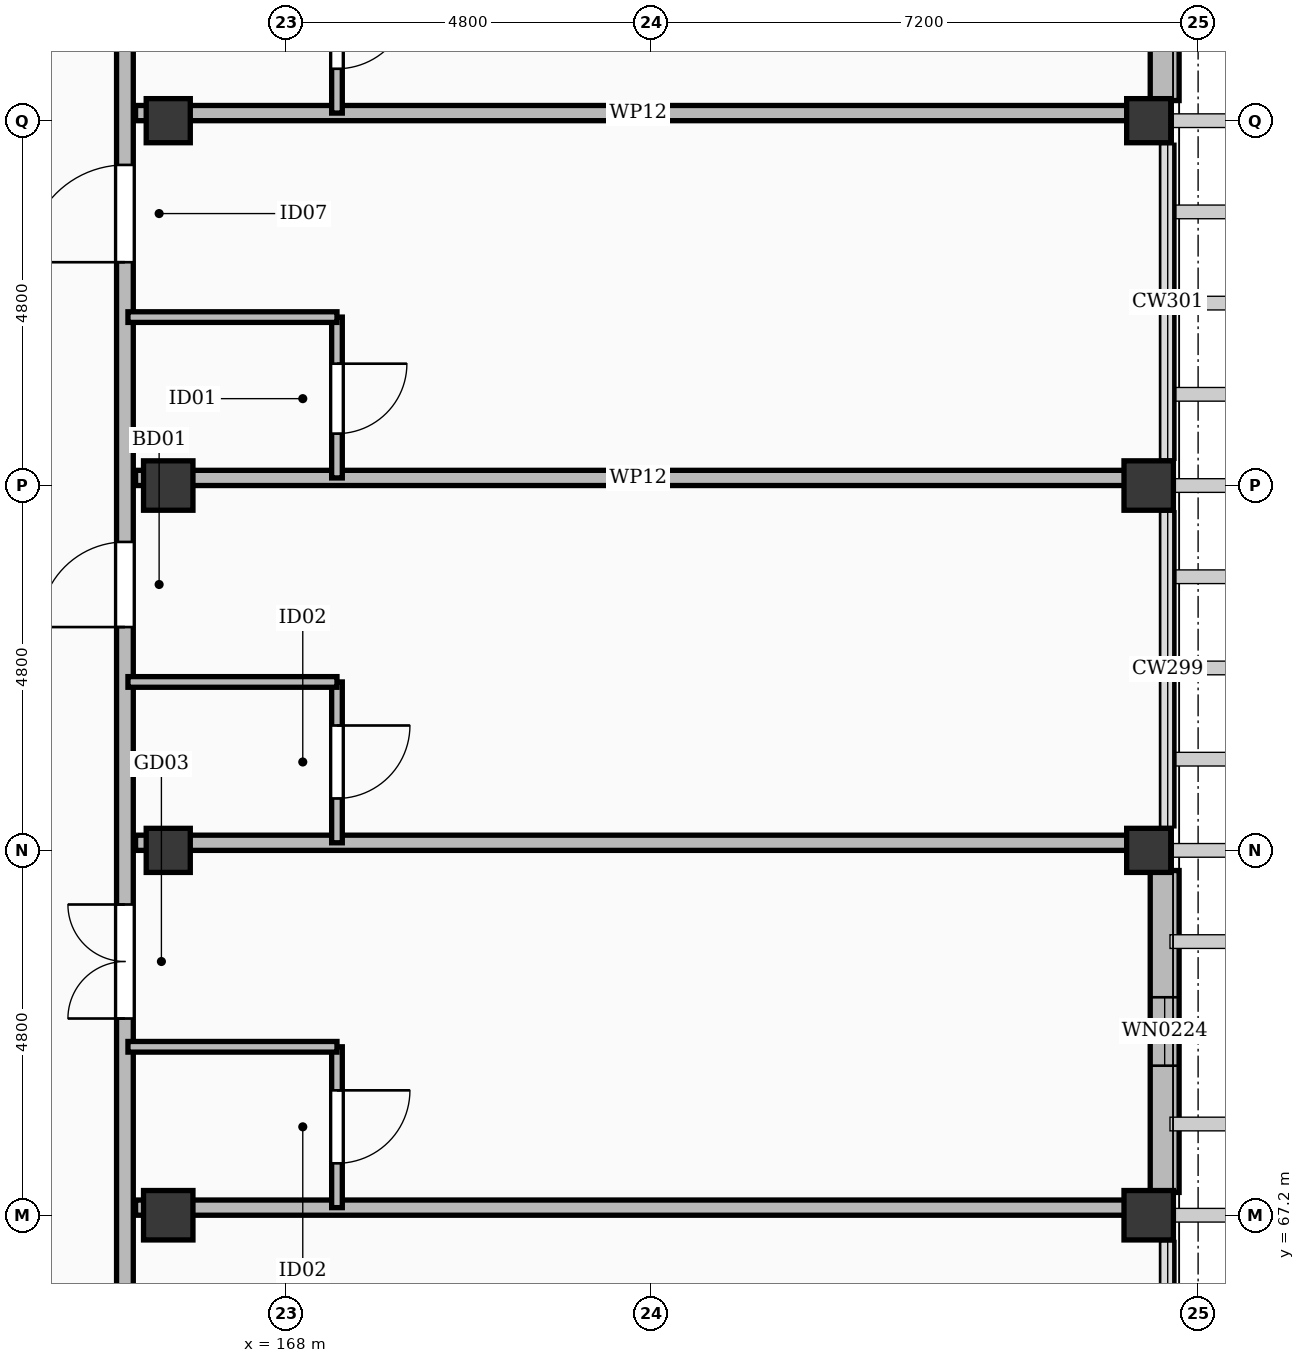
"""IFC4 building model, lengths in metres.
Left out: names, types, materials, properties, quantities, classifications, styles, units other than length and angle.
Written with IfcOpenShell. Run it as: python <this file> out.ifc"""

import sys

from ifc_helpers import new_model, si_unit, direction, frame, frame_2d, origin, origin_2d, place, context, subcontext, project, spatial, rectangle, extrude, element, fill, save


model = new_model("IFC4")
c1 = context("Model", 3, precision=1e-05, world=origin(), true_north=direction((0.0, 1.0)))
c2 = subcontext(c1, "Body", "Model", "MODEL_VIEW")
j1 = project(units=[si_unit("LENGTHUNIT", "METRE"), si_unit("PLANEANGLEUNIT", "RADIAN")], contexts=[c1])
p1 = place(None, origin())
s1 = spatial("IfcSite", under=j1, at=p1, CompositionType="ELEMENT")
p2 = place(p1, origin())
s2 = spatial("IfcBuilding", under=s1, at=p2, CompositionType="ELEMENT")
p3 = place(p2, frame((0.0, 0.0, 39.0)))
s3 = spatial("IfcBuildingStorey", under=s2, at=p3, CompositionType="ELEMENT", Elevation=39.0)
for number, where, z_axis, x_axis in (
    (1, (166.45, 67.2, 0.0), (0.0, 0.0, 1.0), (1.0, 0.0, 0.0)),
    (2, (166.45, 76.8, 0.0), (0.0, 0.0, 1.0), (1.0, 0.0, 0.0)),
    (3, (179.35, 67.2, 0.0), (0.0, 0.0, 1.0), (1.0, 0.0, 0.0)),
    (4, (179.35, 76.8, 0.0), (0.0, 0.0, 1.0), (1.0, 0.0, 0.0)),
):
    element("IfcColumn", number, at=place(p3, frame(where, z_axis=z_axis, x_axis=x_axis)), inside=s3, PredefinedType="COLUMN", context=c2, shape_type="SweptSolid", body=[
        extrude(rectangle(XDim=0.65, YDim=0.65, at=origin_2d()), origin(), (0.0, 0.0, 1.0), 3.6),
    ])
for number, where, z_axis, x_axis in (
    (5, (166.45, 72.0, 0.0), (0.0, 0.0, 1.0), (1.0, 0.0, 0.0)),
    (6, (166.45, 81.6, 0.0), (0.0, 0.0, 1.0), (1.0, 0.0, 0.0)),
    (7, (179.35, 72.0, 0.0), (0.0, 0.0, 1.0), (1.0, 0.0, 0.0)),
    (8, (179.35, 81.6, 0.0), (0.0, 0.0, 1.0), (1.0, 0.0, 0.0)),
):
    element("IfcColumn", number, at=place(p3, frame(where, z_axis=z_axis, x_axis=x_axis)), inside=s3, PredefinedType="COLUMN", context=c2, shape_type="SweptSolid", body=[
        extrude(rectangle(XDim=0.58, YDim=0.58, at=origin_2d()), origin(), (0.0, 0.0, 1.0), 3.6),
    ])
p4 = place(p3, frame((179.56, 71.735, 0.0), z_axis=(0.0, 0.0, 1.0), x_axis=(0.0, -1.0, 0.0)))
e9 = element("IfcWall", 9, at=p4, inside=s3, PredefinedType="SOLIDWALL", context=c2, shape_type="SweptSolid", body=[
    extrude(rectangle(XDim=4.235, YDim=0.38, at=frame_2d((2.118, 0.0))), origin(), (0.0, 0.0, 1.0), 2.602),
])
p5 = place(p4, frame((1.667, 0.0, 0.55)))
e10 = element("IfcOpeningElement", 10, at=p5, cuts=e9, PredefinedType="OPENING", context=c2, shape_type="SweptSolid", body=[
    extrude(rectangle(XDim=0.9, YDim=1.68, at=frame_2d((0.45, 0.84))), frame((0.0, 0.202, 0.0), z_axis=(0.0, -1.0, 0.0), x_axis=(1.0, 0.0, 0.0)), (0.0, 0.0, 1.0), 0.404),
])
p6 = place(p3, frame((179.56, 86.1, 0.0), z_axis=(0.0, 0.0, 1.0), x_axis=(0.0, -1.0, 0.0)))
e11 = element("IfcWall", 11, at=p6, inside=s3, PredefinedType="SOLIDWALL", context=c2, shape_type="SweptSolid", body=[
    extrude(rectangle(XDim=4.235, YDim=0.38, at=frame_2d((2.118, 0.0))), origin(), (0.0, 0.0, 1.0), 2.602),
])
p7 = place(p6, frame((0.992, 0.0, 0.55)))
e12 = element("IfcOpeningElement", 12, at=p7, cuts=e11, PredefinedType="OPENING", context=c2, shape_type="SweptSolid", body=[
    extrude(rectangle(XDim=2.25, YDim=1.79, at=frame_2d((1.125, 0.895))), frame((0.0, 0.202, 0.0), z_axis=(0.0, -1.0, 0.0), x_axis=(1.0, 0.0, 0.0)), (0.0, 0.0, 1.0), 0.404),
])
p8 = place(p3, frame((165.88, 57.95, 0.0), z_axis=(0.0, 0.0, 1.0), x_axis=(0.0, 1.0, 0.0)))
e13 = element("IfcWall", 13, at=p8, inside=s3, PredefinedType="PARTITIONING", context=c2, shape_type="SweptSolid", body=[
    extrude(rectangle(XDim=67.7, YDim=0.22, at=frame_2d((33.85, 0.0))), origin(), (0.0, 0.0, 1.0), 2.602),
])
p9 = place(p8, frame((5.15, 0.0, 0.0)))
e14 = element("IfcOpeningElement", 14, at=p9, cuts=e13, PredefinedType="OPENING", context=c2, shape_type="SweptSolid", body=[
    extrude(rectangle(XDim=0.98, YDim=2.15, at=frame_2d((0.49, 1.075))), frame((0.0, 0.122, 0.0), z_axis=(0.0, -1.0, 0.0), x_axis=(1.0, 0.0, 0.0)), (0.0, 0.0, 1.0), 0.244),
])
p10 = place(p8, frame((11.838, 0.0, 0.0)))
e15 = element("IfcOpeningElement", 15, at=p10, cuts=e13, PredefinedType="OPENING", context=c2, shape_type="SweptSolid", body=[
    extrude(rectangle(XDim=1.5, YDim=2.3, at=frame_2d((0.75, 1.15))), frame((0.0, 0.122, 0.0), z_axis=(0.0, -1.0, 0.0), x_axis=(1.0, 0.0, 0.0)), (0.0, 0.0, 1.0), 0.244),
])
p11 = place(p8, frame((16.988, 0.0, 0.0)))
e16 = element("IfcOpeningElement", 16, at=p11, cuts=e13, PredefinedType="OPENING", context=c2, shape_type="SweptSolid", body=[
    extrude(rectangle(XDim=1.12, YDim=2.15, at=frame_2d((0.56, 1.075))), frame((0.0, 0.122, 0.0), z_axis=(0.0, -1.0, 0.0), x_axis=(1.0, 0.0, 0.0)), (0.0, 0.0, 1.0), 0.244),
])
p12 = place(p8, frame((21.788, 0.0, 0.0)))
e17 = element("IfcOpeningElement", 17, at=p12, cuts=e13, PredefinedType="OPENING", context=c2, shape_type="SweptSolid", body=[
    extrude(rectangle(XDim=1.28, YDim=2.16, at=frame_2d((0.64, 1.08))), frame((0.0, 0.122, 0.0), z_axis=(0.0, -1.0, 0.0), x_axis=(1.0, 0.0, 0.0)), (0.0, 0.0, 1.0), 0.244),
])
p13 = place(p8, frame((26.588, 0.0, 0.0)))
e18 = element("IfcOpeningElement", 18, at=p13, cuts=e13, PredefinedType="OPENING", context=c2, shape_type="SweptSolid", body=[
    extrude(rectangle(XDim=1.05, YDim=2.18, at=frame_2d((0.525, 1.09))), frame((0.0, 0.122, 0.0), z_axis=(0.0, -1.0, 0.0), x_axis=(1.0, 0.0, 0.0)), (0.0, 0.0, 1.0), 0.244),
])
p14 = place(p8, frame((31.388, 0.0, 0.0)))
e19 = element("IfcOpeningElement", 19, at=p14, cuts=e13, PredefinedType="OPENING", context=c2, shape_type="SweptSolid", body=[
    extrude(rectangle(XDim=1.08, YDim=2.25, at=frame_2d((0.54, 1.125))), frame((0.0, 0.122, 0.0), z_axis=(0.0, -1.0, 0.0), x_axis=(1.0, 0.0, 0.0)), (0.0, 0.0, 1.0), 0.244),
])
p15 = place(p8, frame((36.188, 0.0, 0.0)))
e20 = element("IfcOpeningElement", 20, at=p15, cuts=e13, PredefinedType="OPENING", context=c2, shape_type="SweptSolid", body=[
    extrude(rectangle(XDim=1.02, YDim=2.2, at=frame_2d((0.51, 1.1))), frame((0.0, 0.122, 0.0), z_axis=(0.0, -1.0, 0.0), x_axis=(1.0, 0.0, 0.0)), (0.0, 0.0, 1.0), 0.244),
])
p16 = place(p8, frame((40.638, 0.0, 0.0)))
e21 = element("IfcOpeningElement", 21, at=p16, cuts=e13, PredefinedType="OPENING", context=c2, shape_type="SweptSolid", body=[
    extrude(rectangle(XDim=1.5, YDim=2.3, at=frame_2d((0.75, 1.15))), frame((0.0, 0.122, 0.0), z_axis=(0.0, -1.0, 0.0), x_axis=(1.0, 0.0, 0.0)), (0.0, 0.0, 1.0), 0.244),
])
p17 = place(p8, frame((45.788, 0.0, 0.0)))
e22 = element("IfcOpeningElement", 22, at=p17, cuts=e13, PredefinedType="OPENING", context=c2, shape_type="SweptSolid", body=[
    extrude(rectangle(XDim=1.12, YDim=2.15, at=frame_2d((0.56, 1.075))), frame((0.0, 0.122, 0.0), z_axis=(0.0, -1.0, 0.0), x_axis=(1.0, 0.0, 0.0)), (0.0, 0.0, 1.0), 0.244),
])
p18 = place(p8, frame((50.588, 0.0, 0.0)))
e23 = element("IfcOpeningElement", 23, at=p18, cuts=e13, PredefinedType="OPENING", context=c2, shape_type="SweptSolid", body=[
    extrude(rectangle(XDim=1.28, YDim=2.16, at=frame_2d((0.64, 1.08))), frame((0.0, 0.122, 0.0), z_axis=(0.0, -1.0, 0.0), x_axis=(1.0, 0.0, 0.0)), (0.0, 0.0, 1.0), 0.244),
])
p19 = place(p8, frame((55.388, 0.0, 0.0)))
e24 = element("IfcOpeningElement", 24, at=p19, cuts=e13, PredefinedType="OPENING", context=c2, shape_type="SweptSolid", body=[
    extrude(rectangle(XDim=1.05, YDim=2.18, at=frame_2d((0.525, 1.09))), frame((0.0, 0.122, 0.0), z_axis=(0.0, -1.0, 0.0), x_axis=(1.0, 0.0, 0.0)), (0.0, 0.0, 1.0), 0.244),
])
p20 = place(p8, frame((60.188, 0.0, 0.0)))
e25 = element("IfcOpeningElement", 25, at=p20, cuts=e13, PredefinedType="OPENING", context=c2, shape_type="SweptSolid", body=[
    extrude(rectangle(XDim=1.08, YDim=2.25, at=frame_2d((0.54, 1.125))), frame((0.0, 0.122, 0.0), z_axis=(0.0, -1.0, 0.0), x_axis=(1.0, 0.0, 0.0)), (0.0, 0.0, 1.0), 0.244),
])
p21 = place(p8, frame((64.988, 0.0, 0.0)))
e26 = element("IfcOpeningElement", 26, at=p21, cuts=e13, PredefinedType="OPENING", context=c2, shape_type="SweptSolid", body=[
    extrude(rectangle(XDim=1.02, YDim=2.2, at=frame_2d((0.51, 1.1))), frame((0.0, 0.122, 0.0), z_axis=(0.0, -1.0, 0.0), x_axis=(1.0, 0.0, 0.0)), (0.0, 0.0, 1.0), 0.244),
])
p22 = place(p3, frame((166.02, 67.3, 0.0), z_axis=(0.0, 0.0, 1.0), x_axis=(1.0, 0.0, 0.0)))
e27 = element("IfcWall", 27, at=p22, inside=s3, PredefinedType="PARTITIONING", context=c2, shape_type="SweptSolid", body=[
    extrude(rectangle(XDim=13.23, YDim=0.2, at=frame_2d((6.615, 0.0))), origin(), (0.0, 0.0, 1.0), 2.602),
])
p23 = place(p3, frame((168.67, 67.3, 0.0), z_axis=(0.0, 0.0, 1.0), x_axis=(0.0, 1.0, 0.0)))
e28 = element("IfcWall", 28, at=p23, inside=s3, PredefinedType="PARTITIONING", context=c2, shape_type="SweptSolid", body=[
    extrude(rectangle(XDim=2.116, YDim=0.14, at=frame_2d((1.058, 0.0))), origin(), (0.0, 0.0, 1.0), 2.772),
])
p24 = place(p23, frame((0.583, 0.0, 0.0)))
e29 = element("IfcOpeningElement", 29, at=p24, cuts=e28, PredefinedType="OPENING", context=c2, shape_type="SweptSolid", body=[
    extrude(rectangle(XDim=0.96, YDim=2.12, at=frame_2d((0.48, 1.06))), frame((0.0, 0.082, 0.0), z_axis=(0.0, -1.0, 0.0), x_axis=(1.0, 0.0, 0.0)), (0.0, 0.0, 1.0), 0.164),
])
p25 = place(p3, frame((165.92, 69.416, 0.0), z_axis=(0.0, 0.0, 1.0), x_axis=(1.0, 0.0, 0.0)))
e30 = element("IfcWall", 30, at=p25, inside=s3, PredefinedType="PARTITIONING", context=c2, shape_type="SweptSolid", body=[
    extrude(rectangle(XDim=2.75, YDim=0.14, at=frame_2d((1.375, 0.0))), origin(), (0.0, 0.0, 1.0), 2.772),
])
p26 = place(p3, frame((166.02, 72.1, 0.0), z_axis=(0.0, 0.0, 1.0), x_axis=(1.0, 0.0, 0.0)))
e31 = element("IfcWall", 31, at=p26, inside=s3, PredefinedType="PARTITIONING", context=c2, shape_type="SweptSolid", body=[
    extrude(rectangle(XDim=13.23, YDim=0.2, at=frame_2d((6.615, 0.0))), origin(), (0.0, 0.0, 1.0), 2.602),
])
p27 = place(p3, frame((168.67, 72.1, 0.0), z_axis=(0.0, 0.0, 1.0), x_axis=(0.0, 1.0, 0.0)))
e32 = element("IfcWall", 32, at=p27, inside=s3, PredefinedType="PARTITIONING", context=c2, shape_type="SweptSolid", body=[
    extrude(rectangle(XDim=2.116, YDim=0.14, at=frame_2d((1.058, 0.0))), origin(), (0.0, 0.0, 1.0), 2.772),
])
p28 = place(p27, frame((0.583, 0.0, 0.0)))
e33 = element("IfcOpeningElement", 33, at=p28, cuts=e32, PredefinedType="OPENING", context=c2, shape_type="SweptSolid", body=[
    extrude(rectangle(XDim=0.96, YDim=2.12, at=frame_2d((0.48, 1.06))), frame((0.0, 0.082, 0.0), z_axis=(0.0, -1.0, 0.0), x_axis=(1.0, 0.0, 0.0)), (0.0, 0.0, 1.0), 0.164),
])
p29 = place(p3, frame((165.92, 74.216, 0.0), z_axis=(0.0, 0.0, 1.0), x_axis=(1.0, 0.0, 0.0)))
e34 = element("IfcWall", 34, at=p29, inside=s3, PredefinedType="PARTITIONING", context=c2, shape_type="SweptSolid", body=[
    extrude(rectangle(XDim=2.75, YDim=0.14, at=frame_2d((1.375, 0.0))), origin(), (0.0, 0.0, 1.0), 2.772),
])
p30 = place(p3, frame((166.02, 76.9, 0.0), z_axis=(0.0, 0.0, 1.0), x_axis=(1.0, 0.0, 0.0)))
e35 = element("IfcWall", 35, at=p30, inside=s3, PredefinedType="PARTITIONING", context=c2, shape_type="SweptSolid", body=[
    extrude(rectangle(XDim=13.23, YDim=0.2, at=frame_2d((6.615, 0.0))), origin(), (0.0, 0.0, 1.0), 2.602),
])
p31 = place(p3, frame((168.67, 76.9, 0.0), z_axis=(0.0, 0.0, 1.0), x_axis=(0.0, 1.0, 0.0)))
e36 = element("IfcWall", 36, at=p31, inside=s3, PredefinedType="PARTITIONING", context=c2, shape_type="SweptSolid", body=[
    extrude(rectangle(XDim=2.116, YDim=0.14, at=frame_2d((1.058, 0.0))), origin(), (0.0, 0.0, 1.0), 2.772),
])
p32 = place(p31, frame((0.583, 0.0, 0.0)))
e37 = element("IfcOpeningElement", 37, at=p32, cuts=e36, PredefinedType="OPENING", context=c2, shape_type="SweptSolid", body=[
    extrude(rectangle(XDim=0.92, YDim=2.1, at=frame_2d((0.46, 1.05))), frame((0.0, 0.082, 0.0), z_axis=(0.0, -1.0, 0.0), x_axis=(1.0, 0.0, 0.0)), (0.0, 0.0, 1.0), 0.164),
])
p33 = place(p3, frame((165.92, 79.016, 0.0), z_axis=(0.0, 0.0, 1.0), x_axis=(1.0, 0.0, 0.0)))
e38 = element("IfcWall", 38, at=p33, inside=s3, PredefinedType="PARTITIONING", context=c2, shape_type="SweptSolid", body=[
    extrude(rectangle(XDim=2.75, YDim=0.14, at=frame_2d((1.375, 0.0))), origin(), (0.0, 0.0, 1.0), 2.772),
])
p34 = place(p3, frame((166.02, 81.7, 0.0), z_axis=(0.0, 0.0, 1.0), x_axis=(1.0, 0.0, 0.0)))
e39 = element("IfcWall", 39, at=p34, inside=s3, PredefinedType="PARTITIONING", context=c2, shape_type="SweptSolid", body=[
    extrude(rectangle(XDim=13.23, YDim=0.2, at=frame_2d((6.615, 0.0))), origin(), (0.0, 0.0, 1.0), 2.602),
])
p35 = place(p3, frame((168.67, 81.7, 0.0), z_axis=(0.0, 0.0, 1.0), x_axis=(0.0, 1.0, 0.0)))
e40 = element("IfcWall", 40, at=p35, inside=s3, PredefinedType="PARTITIONING", context=c2, shape_type="SweptSolid", body=[
    extrude(rectangle(XDim=2.116, YDim=0.14, at=frame_2d((1.058, 0.0))), origin(), (0.0, 0.0, 1.0), 2.772),
])
p36 = place(p35, frame((0.583, 0.0, 0.0)))
e41 = element("IfcOpeningElement", 41, at=p36, cuts=e40, PredefinedType="OPENING", context=c2, shape_type="SweptSolid", body=[
    extrude(rectangle(XDim=0.96, YDim=2.12, at=frame_2d((0.48, 1.06))), frame((0.0, 0.082, 0.0), z_axis=(0.0, -1.0, 0.0), x_axis=(1.0, 0.0, 0.0)), (0.0, 0.0, 1.0), 0.164),
])
p37 = place(p5, origin())
e42 = element("IfcWindow", 42, at=p37, inside=s3, PartitioningType="SINGLE_PANEL", PredefinedType="WINDOW", context=c2, shape_type="SweptSolid", body=[
    extrude(rectangle(XDim=0.9, YDim=1.68, at=frame_2d((0.45, 0.84))), frame((0.0, 0.03, 0.0), z_axis=(0.0, -1.0, 0.0), x_axis=(1.0, 0.0, 0.0)), (0.0, 0.0, 1.0), 0.06),
])
fill(e10, e42)
p38 = place(p10, origin())
e43 = element("IfcDoor", 43, at=p38, inside=s3, OperationType="DOUBLE_DOOR_SINGLE_SWING", PredefinedType="DOOR", context=c2, shape_type="SweptSolid", body=[
    extrude(rectangle(XDim=1.5, YDim=2.3, at=frame_2d((0.75, 1.15))), frame((0.0, 0.025, 0.0), z_axis=(0.0, -1.0, 0.0), x_axis=(1.0, 0.0, 0.0)), (0.0, 0.0, 1.0), 0.05),
])
fill(e15, e43)
p39 = place(p24, frame((0.96, 0.0, 0.0), z_axis=(0.0, 0.0, 1.0), x_axis=(-1.0, 0.0, 0.0)))
e44 = element("IfcDoor", 44, at=p39, inside=s3, OperationType="SINGLE_SWING_RIGHT", PredefinedType="DOOR", context=c2, shape_type="SweptSolid", body=[
    extrude(rectangle(XDim=0.96, YDim=2.12, at=frame_2d((0.48, 1.06))), frame((0.0, 0.025, 0.0), z_axis=(0.0, -1.0, 0.0), x_axis=(1.0, 0.0, 0.0)), (0.0, 0.0, 1.0), 0.05),
])
fill(e29, e44)
p40 = place(p11, origin())
e45 = element("IfcDoor", 45, at=p40, inside=s3, OperationType="SINGLE_SWING_LEFT", PredefinedType="DOOR", context=c2, shape_type="SweptSolid", body=[
    extrude(rectangle(XDim=1.12, YDim=2.15, at=frame_2d((0.56, 1.075))), frame((0.0, 0.025, 0.0), z_axis=(0.0, -1.0, 0.0), x_axis=(1.0, 0.0, 0.0)), (0.0, 0.0, 1.0), 0.05),
])
fill(e16, e45)
p41 = place(p28, frame((0.96, 0.0, 0.0), z_axis=(0.0, 0.0, 1.0), x_axis=(-1.0, 0.0, 0.0)))
e46 = element("IfcDoor", 46, at=p41, inside=s3, OperationType="SINGLE_SWING_RIGHT", PredefinedType="DOOR", context=c2, shape_type="SweptSolid", body=[
    extrude(rectangle(XDim=0.96, YDim=2.12, at=frame_2d((0.48, 1.06))), frame((0.0, 0.025, 0.0), z_axis=(0.0, -1.0, 0.0), x_axis=(1.0, 0.0, 0.0)), (0.0, 0.0, 1.0), 0.05),
])
fill(e33, e46)
p42 = place(p12, origin())
e47 = element("IfcDoor", 47, at=p42, inside=s3, OperationType="SINGLE_SWING_LEFT", PredefinedType="DOOR", context=c2, shape_type="SweptSolid", body=[
    extrude(rectangle(XDim=1.28, YDim=2.16, at=frame_2d((0.64, 1.08))), frame((0.0, 0.025, 0.0), z_axis=(0.0, -1.0, 0.0), x_axis=(1.0, 0.0, 0.0)), (0.0, 0.0, 1.0), 0.05),
])
fill(e17, e47)
p43 = place(p32, frame((0.92, 0.0, 0.0), z_axis=(0.0, 0.0, 1.0), x_axis=(-1.0, 0.0, 0.0)))
e48 = element("IfcDoor", 48, at=p43, inside=s3, OperationType="SINGLE_SWING_RIGHT", PredefinedType="DOOR", context=c2, shape_type="SweptSolid", body=[
    extrude(rectangle(XDim=0.92, YDim=2.1, at=frame_2d((0.46, 1.05))), frame((0.0, 0.025, 0.0), z_axis=(0.0, -1.0, 0.0), x_axis=(1.0, 0.0, 0.0)), (0.0, 0.0, 1.0), 0.05),
])
fill(e37, e48)
p44 = place(p36, frame((0.96, 0.0, 0.0), z_axis=(0.0, 0.0, 1.0), x_axis=(-1.0, 0.0, 0.0)))
e49 = element("IfcDoor", 49, at=p44, inside=s3, OperationType="SINGLE_SWING_RIGHT", PredefinedType="DOOR", context=c2, shape_type="SweptSolid", body=[
    extrude(rectangle(XDim=0.96, YDim=2.12, at=frame_2d((0.48, 1.06))), frame((0.0, 0.025, 0.0), z_axis=(0.0, -1.0, 0.0), x_axis=(1.0, 0.0, 0.0)), (0.0, 0.0, 1.0), 0.05),
])
fill(e41, e49)
save(model, sys.argv[1])
